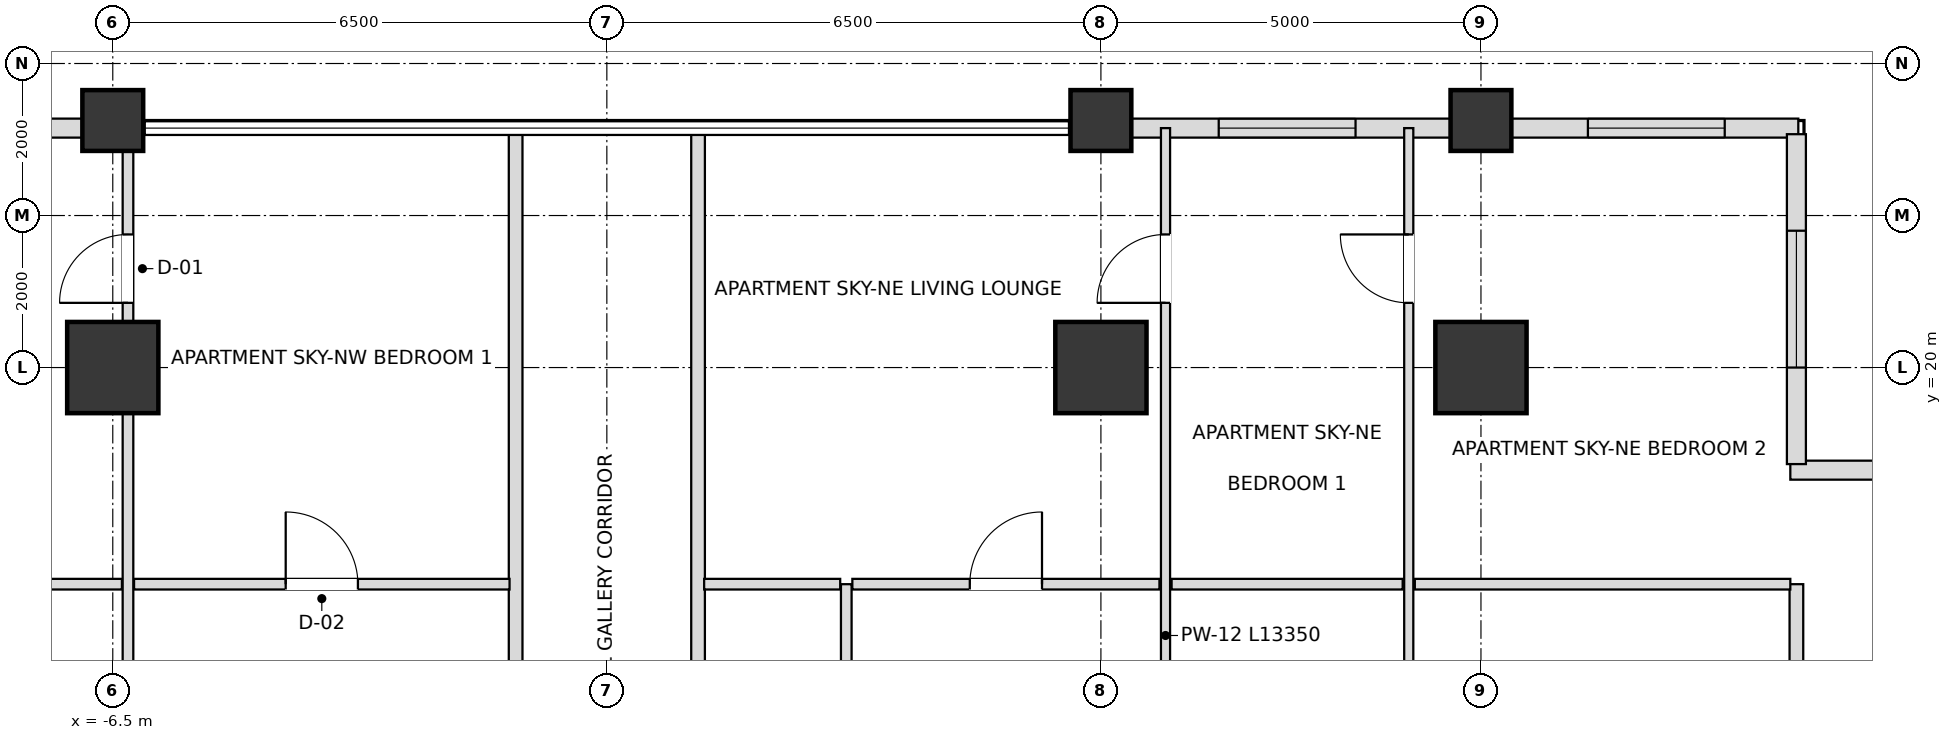
"""IFC4 building model, lengths in metres.
Left out: names, types, materials, properties, quantities, classifications, styles, units other than length and angle.
Written with IfcOpenShell. Run it as: python <this file> out.ifc"""

import sys

from ifc_helpers import new_model, si_unit, direction, frame, frame_2d, origin, origin_2d, place, context, subcontext, project, spatial, rectangle, extrude, element, fill, save


model = new_model("IFC4")
c1 = context("Model", 3, precision=1e-05, world=origin(), true_north=direction((0.0, 1.0)))
c2 = subcontext(c1, "Body", "Model", "MODEL_VIEW")
j1 = project(units=[si_unit("LENGTHUNIT", "METRE"), si_unit("PLANEANGLEUNIT", "RADIAN")], contexts=[c1])
p1 = place(None, origin())
s1 = spatial("IfcSite", under=j1, at=p1, CompositionType="ELEMENT")
p2 = place(p1, origin())
s2 = spatial("IfcBuilding", under=s1, at=p2, CompositionType="ELEMENT")
p3 = place(p2, frame((0.0, 0.0, 129.6)))
s3 = spatial("IfcBuildingStorey", under=s2, at=p3, CompositionType="ELEMENT", Elevation=129.6)
for number, where, z_axis, x_axis in (
    (1, (11.5, 20.0, 0.0), (0.0, 0.0, 1.0), (1.0, 0.0, 0.0)),
    (2, (6.5, 20.0, 0.0), (0.0, 0.0, 1.0), (1.0, 0.0, 0.0)),
    (3, (-6.5, 20.0, 0.0), (0.0, 0.0, 1.0), (1.0, 0.0, 0.0)),
):
    element("IfcColumn", number, at=place(p3, frame(where, z_axis=z_axis, x_axis=x_axis)), inside=s3, PredefinedType="USERDEFINED", context=c2, shape_type="SweptSolid", body=[
        extrude(rectangle(XDim=1.2, YDim=1.2, at=origin_2d()), origin(), (0.0, 0.0, 1.0), 3.6),
    ])
for number, where, z_axis, x_axis in (
    (4, (-6.5, 23.25, 0.0), (0.0, 0.0, 1.0), (1.0, 0.0, 0.0)),
    (5, (6.5, 23.25, 0.0), (0.0, 0.0, 1.0), (1.0, 0.0, 0.0)),
    (6, (11.5, 23.25, 0.0), (0.0, 0.0, 1.0), (1.0, 0.0, 0.0)),
):
    element("IfcColumn", number, at=place(p3, frame(where, z_axis=z_axis, x_axis=x_axis)), inside=s3, PredefinedType="COLUMN", context=c2, shape_type="SweptSolid", body=[
        extrude(rectangle(XDim=0.8, YDim=0.8, at=origin_2d()), origin(), (0.0, 0.0, 1.0), 3.6),
    ])
p4 = place(p3, frame((15.675, 23.15, 0.0), z_axis=(0.0, 0.0, 1.0), x_axis=(-1.0, 0.0, 0.0)))
e7 = element("IfcWall", 7, at=p4, inside=s3, PredefinedType="SOLIDWALL", context=c2, shape_type="SweptSolid", body=[
    extrude(rectangle(XDim=3.78, YDim=0.25, at=frame_2d((1.89, 0.0))), origin(), (0.0, 0.0, 1.0), 2.736),
])
p5 = place(p4, frame((0.968, 0.0, 0.72)))
e8 = element("IfcOpeningElement", 8, at=p5, cuts=e7, PredefinedType="OPENING", context=c2, shape_type="SweptSolid", body=[
    extrude(rectangle(XDim=1.8, YDim=1.68, at=frame_2d((0.9, 0.84))), frame((0.0, 0.135, 0.0), z_axis=(0.0, -1.0, 0.0), x_axis=(1.0, 0.0, 0.0)), (0.0, 0.0, 1.0), 0.27),
])
p6 = place(p3, frame((11.105, 23.15, 0.0), z_axis=(0.0, 0.0, 1.0), x_axis=(-1.0, 0.0, 0.0)))
e9 = element("IfcWall", 9, at=p6, inside=s3, PredefinedType="SOLIDWALL", context=c2, shape_type="SweptSolid", body=[
    extrude(rectangle(XDim=4.21, YDim=0.25, at=frame_2d((2.105, 0.0))), origin(), (0.0, 0.0, 1.0), 2.736),
])
p7 = place(p6, frame((1.255, 0.0, 0.72)))
e10 = element("IfcOpeningElement", 10, at=p7, cuts=e9, PredefinedType="OPENING", context=c2, shape_type="SweptSolid", body=[
    extrude(rectangle(XDim=1.8, YDim=1.68, at=frame_2d((0.9, 0.84))), frame((0.0, 0.135, 0.0), z_axis=(0.0, -1.0, 0.0), x_axis=(1.0, 0.0, 0.0)), (0.0, 0.0, 1.0), 0.27),
])
p8 = place(p3, frame((-6.895, 23.15, 0.0), z_axis=(0.0, 0.0, 1.0), x_axis=(-1.0, 0.0, 0.0)))
e11 = element("IfcWall", 11, at=p8, inside=s3, PredefinedType="SOLIDWALL", context=c2, shape_type="SweptSolid", body=[
    extrude(rectangle(XDim=4.21, YDim=0.25, at=frame_2d((2.105, 0.0))), origin(), (0.0, 0.0, 1.0), 2.736),
])
p9 = place(p8, frame((1.205, 0.0, 0.72)))
e12 = element("IfcOpeningElement", 12, at=p9, cuts=e11, PredefinedType="OPENING", context=c2, shape_type="SweptSolid", body=[
    extrude(rectangle(XDim=1.8, YDim=1.68, at=frame_2d((0.9, 0.84))), frame((0.0, 0.135, 0.0), z_axis=(0.0, -1.0, 0.0), x_axis=(1.0, 0.0, 0.0)), (0.0, 0.0, 1.0), 0.27),
])
p10 = place(p3, frame((20.23, 18.65, 0.0), z_axis=(0.0, 0.0, 1.0), x_axis=(-1.0, 0.0, 0.0)))
e13 = element("IfcWall", 13, at=p10, inside=s3, PredefinedType="SOLIDWALL", context=c2, shape_type="SweptSolid", body=[
    extrude(rectangle(XDim=4.66, YDim=0.25, at=frame_2d((2.33, 0.0))), origin(), (0.0, 0.0, 1.0), 2.736),
])
p11 = place(p10, frame((1.43, 0.0, 0.72)))
e14 = element("IfcOpeningElement", 14, at=p11, cuts=e13, PredefinedType="OPENING", context=c2, shape_type="SweptSolid", body=[
    extrude(rectangle(XDim=1.8, YDim=1.68, at=frame_2d((0.9, 0.84))), frame((0.0, 0.135, 0.0), z_axis=(0.0, -1.0, 0.0), x_axis=(1.0, 0.0, 0.0)), (0.0, 0.0, 1.0), 0.27),
])
p12 = place(p3, frame((15.65, 18.73, 0.0), z_axis=(0.0, 0.0, 1.0), x_axis=(0.0, 1.0, 0.0)))
e15 = element("IfcWall", 15, at=p12, inside=s3, PredefinedType="SOLIDWALL", context=c2, shape_type="SweptSolid", body=[
    extrude(rectangle(XDim=4.34, YDim=0.25, at=frame_2d((2.17, 0.0))), origin(), (0.0, 0.0, 1.0), 2.736),
])
p13 = place(p12, frame((1.27, 0.0, 0.72)))
e16 = element("IfcOpeningElement", 16, at=p13, cuts=e15, PredefinedType="OPENING", context=c2, shape_type="SweptSolid", body=[
    extrude(rectangle(XDim=1.8, YDim=1.68, at=frame_2d((0.9, 0.84))), frame((0.0, 0.135, 0.0), z_axis=(0.0, -1.0, 0.0), x_axis=(1.0, 0.0, 0.0)), (0.0, 0.0, 1.0), 0.27),
])
p14 = place(p3, frame((-6.3, 9.8, 0.0), z_axis=(0.0, 0.0, 1.0), x_axis=(0.0, 1.0, 0.0)))
e17 = element("IfcWall", 17, at=p14, inside=s3, PredefinedType="PARTITIONING", context=c2, shape_type="SweptSolid", body=[
    extrude(rectangle(XDim=13.35, YDim=0.14, at=frame_2d((6.675, 0.0))), origin(), (0.0, 0.0, 1.0), 2.816),
])
p15 = place(p14, frame((11.051, 0.0, 0.0)))
e18 = element("IfcOpeningElement", 18, at=p15, cuts=e17, PredefinedType="OPENING", context=c2, shape_type="SweptSolid", body=[
    extrude(rectangle(XDim=0.9, YDim=2.1, at=frame_2d((0.45, 1.05))), frame((0.0, 0.08, 0.0), z_axis=(0.0, -1.0, 0.0), x_axis=(1.0, 0.0, 0.0)), (0.0, 0.0, 1.0), 0.16),
])
for number, where, z_axis, x_axis in (
    (19, (-1.2, 9.8, 0.0), (0.0, 0.0, 1.0), (0.0, 1.0, 0.0)),
    (20, (1.2, 9.8, 0.0), (0.0, 0.0, 1.0), (0.0, 1.0, 0.0)),
):
    element("IfcWall", number, at=place(p3, frame(where, z_axis=z_axis, x_axis=x_axis)), inside=s3, PredefinedType="PARTITIONING", context=c2, shape_type="SweptSolid", body=[
        extrude(rectangle(XDim=13.35, YDim=0.18, at=frame_2d((6.675, 0.0))), origin(), (0.0, 0.0, 1.0), 2.816),
    ])
p16 = place(p3, frame((3.15, 9.8, 0.0), z_axis=(0.0, 0.0, 1.0), x_axis=(0.0, 1.0, 0.0)))
e21 = element("IfcWall", 21, at=p16, inside=s3, PredefinedType="PARTITIONING", context=c2, shape_type="SweptSolid", body=[
    extrude(rectangle(XDim=7.35, YDim=0.14, at=frame_2d((3.675, 0.0))), origin(), (0.0, 0.0, 1.0), 3.38),
])
p17 = place(p16, frame((3.22, 0.0, 0.0)))
e22 = element("IfcOpeningElement", 22, at=p17, cuts=e21, PredefinedType="OPENING", context=c2, shape_type="SweptSolid", body=[
    extrude(rectangle(XDim=0.9, YDim=2.1, at=frame_2d((0.45, 1.05))), frame((0.0, 0.08, 0.0), z_axis=(0.0, -1.0, 0.0), x_axis=(1.0, 0.0, 0.0)), (0.0, 0.0, 1.0), 0.16),
])
p18 = place(p3, frame((7.35, 9.8, 0.0), z_axis=(0.0, 0.0, 1.0), x_axis=(0.0, 1.0, 0.0)))
e23 = element("IfcWall", 23, at=p18, inside=s3, PredefinedType="PARTITIONING", context=c2, shape_type="SweptSolid", body=[
    extrude(rectangle(XDim=13.35, YDim=0.12, at=frame_2d((6.675, 0.0))), origin(), (0.0, 0.0, 1.0), 2.816),
])
p19 = place(p18, frame((3.195, 0.0, 0.0)))
e24 = element("IfcOpeningElement", 24, at=p19, cuts=e23, PredefinedType="OPENING", context=c2, shape_type="SweptSolid", body=[
    extrude(rectangle(XDim=0.95, YDim=2.1, at=frame_2d((0.475, 1.05))), frame((0.0, 0.07, 0.0), z_axis=(0.0, -1.0, 0.0), x_axis=(1.0, 0.0, 0.0)), (0.0, 0.0, 1.0), 0.14),
])
p20 = place(p18, frame((11.051, 0.0, 0.0)))
e25 = element("IfcOpeningElement", 25, at=p20, cuts=e23, PredefinedType="OPENING", context=c2, shape_type="SweptSolid", body=[
    extrude(rectangle(XDim=0.9, YDim=2.1, at=frame_2d((0.45, 1.05))), frame((0.0, 0.07, 0.0), z_axis=(0.0, -1.0, 0.0), x_axis=(1.0, 0.0, 0.0)), (0.0, 0.0, 1.0), 0.14),
])
p21 = place(p3, frame((10.55, 9.8, 0.0), z_axis=(0.0, 0.0, 1.0), x_axis=(0.0, 1.0, 0.0)))
e26 = element("IfcWall", 26, at=p21, inside=s3, PredefinedType="PARTITIONING", context=c2, shape_type="SweptSolid", body=[
    extrude(rectangle(XDim=13.35, YDim=0.12, at=frame_2d((6.675, 0.0))), origin(), (0.0, 0.0, 1.0), 2.816),
])
p22 = place(p21, frame((3.713, 0.0, 0.0)))
e27 = element("IfcOpeningElement", 27, at=p22, cuts=e26, PredefinedType="OPENING", context=c2, shape_type="SweptSolid", body=[
    extrude(rectangle(XDim=0.95, YDim=2.1, at=frame_2d((0.475, 1.05))), frame((0.0, 0.07, 0.0), z_axis=(0.0, -1.0, 0.0), x_axis=(1.0, 0.0, 0.0)), (0.0, 0.0, 1.0), 0.14),
])
p23 = place(p21, frame((11.051, 0.0, 0.0)))
e28 = element("IfcOpeningElement", 28, at=p23, cuts=e26, PredefinedType="OPENING", context=c2, shape_type="SweptSolid", body=[
    extrude(rectangle(XDim=0.9, YDim=2.1, at=frame_2d((0.45, 1.05))), frame((0.0, 0.07, 0.0), z_axis=(0.0, -1.0, 0.0), x_axis=(1.0, 0.0, 0.0)), (0.0, 0.0, 1.0), 0.14),
])
p24 = place(p3, frame((15.65, 9.8, 0.0), z_axis=(0.0, 0.0, 1.0), x_axis=(0.0, 1.0, 0.0)))
e29 = element("IfcWall", 29, at=p24, inside=s3, PredefinedType="PARTITIONING", context=c2, shape_type="SweptSolid", body=[
    extrude(rectangle(XDim=7.35, YDim=0.18, at=frame_2d((3.675, 0.0))), origin(), (0.0, 0.0, 1.0), 2.736),
])
p25 = place(p3, frame((-8.17, 17.15, 0.0), z_axis=(0.0, 0.0, 1.0), x_axis=(1.0, 0.0, 0.0)))
e30 = element("IfcWall", 30, at=p25, inside=s3, PredefinedType="PARTITIONING", context=c2, shape_type="SweptSolid", body=[
    extrude(rectangle(XDim=1.79, YDim=0.14, at=frame_2d((0.895, 0.0))), origin(), (0.0, 0.0, 1.0), 2.816),
])
p26 = place(p3, frame((-6.22, 17.15, 0.0), z_axis=(0.0, 0.0, 1.0), x_axis=(1.0, 0.0, 0.0)))
e31 = element("IfcWall", 31, at=p26, inside=s3, PredefinedType="PARTITIONING", context=c2, shape_type="SweptSolid", body=[
    extrude(rectangle(XDim=4.94, YDim=0.14, at=frame_2d((2.47, 0.0))), origin(), (0.0, 0.0, 1.0), 3.38),
])
p27 = place(p26, frame((1.995, 0.0, 0.0)))
e32 = element("IfcOpeningElement", 32, at=p27, cuts=e31, PredefinedType="OPENING", context=c2, shape_type="SweptSolid", body=[
    extrude(rectangle(XDim=0.95, YDim=2.1, at=frame_2d((0.475, 1.05))), frame((0.0, 0.08, 0.0), z_axis=(0.0, -1.0, 0.0), x_axis=(1.0, 0.0, 0.0)), (0.0, 0.0, 1.0), 0.16),
])
p28 = place(p3, frame((1.28, 17.15, 0.0), z_axis=(0.0, 0.0, 1.0), x_axis=(1.0, 0.0, 0.0)))
e33 = element("IfcWall", 33, at=p28, inside=s3, PredefinedType="PARTITIONING", context=c2, shape_type="SweptSolid", body=[
    extrude(rectangle(XDim=1.79, YDim=0.14, at=frame_2d((0.895, 0.0))), origin(), (0.0, 0.0, 1.0), 3.38),
])
p29 = place(p3, frame((3.23, 17.15, 0.0), z_axis=(0.0, 0.0, 1.0), x_axis=(1.0, 0.0, 0.0)))
e34 = element("IfcWall", 34, at=p29, inside=s3, PredefinedType="PARTITIONING", context=c2, shape_type="SweptSolid", body=[
    extrude(rectangle(XDim=4.04, YDim=0.14, at=frame_2d((2.02, 0.0))), origin(), (0.0, 0.0, 1.0), 2.816),
])
p30 = place(p29, frame((1.545, 0.0, 0.0)))
e35 = element("IfcOpeningElement", 35, at=p30, cuts=e34, PredefinedType="OPENING", context=c2, shape_type="SweptSolid", body=[
    extrude(rectangle(XDim=0.95, YDim=2.1, at=frame_2d((0.475, 1.05))), frame((0.0, 0.08, 0.0), z_axis=(0.0, -1.0, 0.0), x_axis=(1.0, 0.0, 0.0)), (0.0, 0.0, 1.0), 0.16),
])
p31 = place(p3, frame((7.43, 17.15, 0.0), z_axis=(0.0, 0.0, 1.0), x_axis=(1.0, 0.0, 0.0)))
e36 = element("IfcWall", 36, at=p31, inside=s3, PredefinedType="PARTITIONING", context=c2, shape_type="SweptSolid", body=[
    extrude(rectangle(XDim=3.04, YDim=0.14, at=frame_2d((1.52, 0.0))), origin(), (0.0, 0.0, 1.0), 3.38),
])
p32 = place(p3, frame((10.63, 17.15, 0.0), z_axis=(0.0, 0.0, 1.0), x_axis=(1.0, 0.0, 0.0)))
e37 = element("IfcWall", 37, at=p32, inside=s3, PredefinedType="PARTITIONING", context=c2, shape_type="SweptSolid", body=[
    extrude(rectangle(XDim=4.94, YDim=0.14, at=frame_2d((2.47, 0.0))), origin(), (0.0, 0.0, 1.0), 2.736),
])
p33 = place(p5, origin())
e38 = element("IfcWindow", 38, at=p33, inside=s3, PartitioningType="SINGLE_PANEL", PredefinedType="WINDOW", context=c2, shape_type="SweptSolid", body=[
    extrude(rectangle(XDim=1.8, YDim=1.68, at=frame_2d((0.9, 0.84))), frame((0.0, 0.03, 0.0), z_axis=(0.0, -1.0, 0.0), x_axis=(1.0, 0.0, 0.0)), (0.0, 0.0, 1.0), 0.06),
])
fill(e8, e38)
p34 = place(p7, origin())
e39 = element("IfcWindow", 39, at=p34, inside=s3, PartitioningType="SINGLE_PANEL", PredefinedType="WINDOW", context=c2, shape_type="SweptSolid", body=[
    extrude(rectangle(XDim=1.8, YDim=1.68, at=frame_2d((0.9, 0.84))), frame((0.0, 0.03, 0.0), z_axis=(0.0, -1.0, 0.0), x_axis=(1.0, 0.0, 0.0)), (0.0, 0.0, 1.0), 0.06),
])
fill(e10, e39)
p35 = place(p13, origin())
e40 = element("IfcWindow", 40, at=p35, inside=s3, PartitioningType="SINGLE_PANEL", PredefinedType="WINDOW", context=c2, shape_type="SweptSolid", body=[
    extrude(rectangle(XDim=1.8, YDim=1.68, at=frame_2d((0.9, 0.84))), frame((0.0, 0.03, 0.0), z_axis=(0.0, -1.0, 0.0), x_axis=(1.0, 0.0, 0.0)), (0.0, 0.0, 1.0), 0.06),
])
fill(e16, e40)
p36 = place(p27, origin())
e41 = element("IfcDoor", 41, at=p36, inside=s3, OperationType="SINGLE_SWING_LEFT", PredefinedType="DOOR", context=c2, shape_type="SweptSolid", body=[
    extrude(rectangle(XDim=0.95, YDim=2.1, at=frame_2d((0.475, 1.05))), frame((0.0, 0.025, 0.0), z_axis=(0.0, -1.0, 0.0), x_axis=(1.0, 0.0, 0.0)), (0.0, 0.0, 1.0), 0.05),
])
fill(e32, e41)
p37 = place(p15, origin())
e42 = element("IfcDoor", 42, at=p37, inside=s3, OperationType="SINGLE_SWING_LEFT", PredefinedType="DOOR", context=c2, shape_type="SweptSolid", body=[
    extrude(rectangle(XDim=0.9, YDim=2.1, at=frame_2d((0.45, 1.05))), frame((0.0, 0.025, 0.0), z_axis=(0.0, -1.0, 0.0), x_axis=(1.0, 0.0, 0.0)), (0.0, 0.0, 1.0), 0.05),
])
fill(e18, e42)
p38 = place(p30, origin())
e43 = element("IfcDoor", 43, at=p38, inside=s3, OperationType="SINGLE_SWING_RIGHT", PredefinedType="DOOR", context=c2, shape_type="SweptSolid", body=[
    extrude(rectangle(XDim=0.95, YDim=2.1, at=frame_2d((0.475, 1.05))), frame((0.0, 0.025, 0.0), z_axis=(0.0, -1.0, 0.0), x_axis=(1.0, 0.0, 0.0)), (0.0, 0.0, 1.0), 0.05),
])
fill(e35, e43)
p39 = place(p20, origin())
e44 = element("IfcDoor", 44, at=p39, inside=s3, OperationType="SINGLE_SWING_LEFT", PredefinedType="DOOR", context=c2, shape_type="SweptSolid", body=[
    extrude(rectangle(XDim=0.9, YDim=2.1, at=frame_2d((0.45, 1.05))), frame((0.0, 0.025, 0.0), z_axis=(0.0, -1.0, 0.0), x_axis=(1.0, 0.0, 0.0)), (0.0, 0.0, 1.0), 0.05),
])
fill(e25, e44)
p40 = place(p23, origin())
e45 = element("IfcDoor", 45, at=p40, inside=s3, OperationType="SINGLE_SWING_RIGHT", PredefinedType="DOOR", context=c2, shape_type="SweptSolid", body=[
    extrude(rectangle(XDim=0.9, YDim=2.1, at=frame_2d((0.45, 1.05))), frame((0.0, 0.025, 0.0), z_axis=(0.0, -1.0, 0.0), x_axis=(1.0, 0.0, 0.0)), (0.0, 0.0, 1.0), 0.05),
])
fill(e28, e45)
save(model, sys.argv[1])
